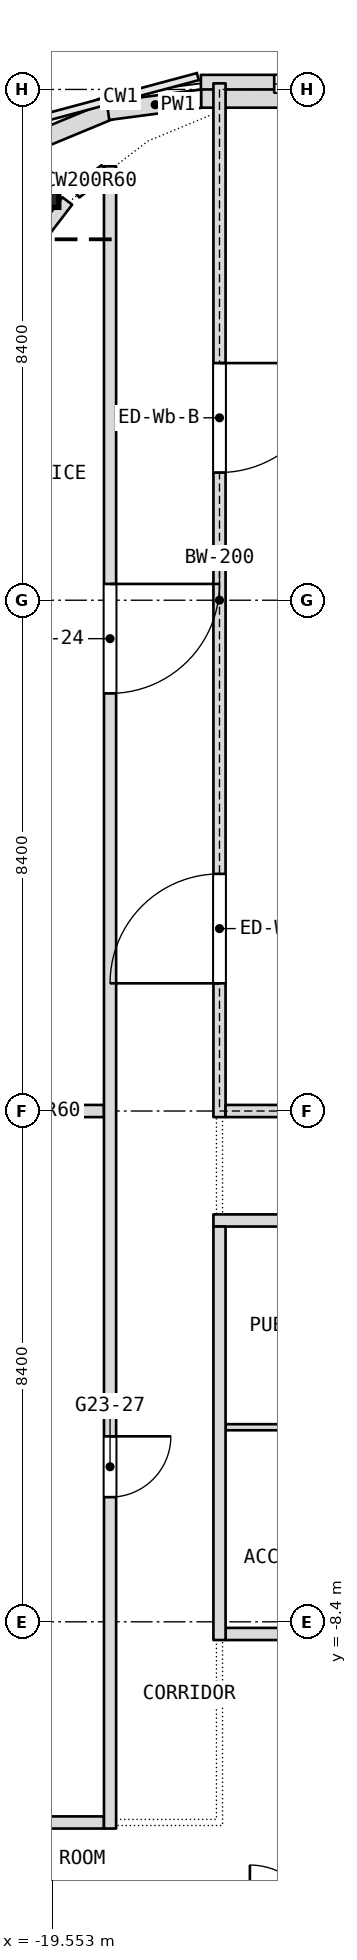
"""IFC4 building model, lengths in metres.
Left out: names, types, materials, properties, quantities, classifications, styles, units other than length and angle.
Written with IfcOpenShell. Run it as: python <this file> out.ifc"""

import sys

from ifc_helpers import new_model, si_unit, direction, frame, frame_2d, origin, origin_2d, place, context, subcontext, project, spatial, rectangle, i_section, extrude, element, fill, save


model = new_model("IFC4")
c1 = context("Model", 3, precision=1e-05, world=origin(), true_north=direction((0.0, 1.0)))
c2 = subcontext(c1, "Body", "Model", "MODEL_VIEW")
j1 = project(units=[si_unit("LENGTHUNIT", "METRE"), si_unit("PLANEANGLEUNIT", "RADIAN")], contexts=[c1])
p1 = place(None, origin())
s1 = spatial("IfcSite", under=j1, at=p1, CompositionType="ELEMENT")
p2 = place(p1, origin())
s2 = spatial("IfcBuilding", under=s1, at=p2, CompositionType="ELEMENT")
p3 = place(p2, frame((0.0, 0.0, 277.7)))
s3 = spatial("IfcBuildingStorey", under=s2, at=p3, CompositionType="ELEMENT", Elevation=277.7)
p4 = place(p3, frame((-19.596, 15.123, -0.26), z_axis=(0.0, 0.0, 1.0), x_axis=(1.0, 0.0, 0.0)))
e1 = element("IfcColumn", 1, at=p4, inside=s3, PredefinedType="COLUMN", context=c2, shape_type="SweptSolid", body=[
    extrude(i_section(OverallWidth=0.306, OverallDepth=0.524, WebThickness=0.024, FlangeThickness=0.04, FilletRadius=0.027, at=origin_2d()), origin(), (0.0, 0.0, 1.0), 3.2),
])
p5 = place(p3, frame((-21.0, -11.7, 0.0), z_axis=(0.0, 0.0, 1.0), x_axis=(1.0, 0.0, 0.0)))
e2 = element("IfcWall", 2, at=p5, inside=s3, PredefinedType="PARTITIONING", context=c2, shape_type="SweptSolid", body=[
    extrude(rectangle(XDim=2.3, YDim=0.2, at=frame_2d((1.15, 0.0))), origin(), (0.0, 0.0, 1.0), 3.34),
])
p6 = place(p3, frame((-16.7, -8.6, 0.0), z_axis=(0.0, 0.0, 1.0), x_axis=(1.0, 0.0, 0.0)))
e3 = element("IfcWall", 3, at=p6, inside=s3, PredefinedType="PARTITIONING", context=c2, shape_type="SweptSolid", body=[
    extrude(rectangle(XDim=8.4, YDim=0.2, at=frame_2d((4.2, 0.0))), origin(), (0.0, 0.0, 1.0), 3.34),
])
p7 = place(p3, frame((-16.7, -5.2, 0.0), z_axis=(0.0, 0.0, 1.0), x_axis=(1.0, 0.0, 0.0)))
e4 = element("IfcWall", 4, at=p7, inside=s3, PredefinedType="PARTITIONING", context=c2, shape_type="SweptSolid", body=[
    extrude(rectangle(XDim=4.2, YDim=0.1, at=frame_2d((2.1, 0.0))), origin(), (0.0, 0.0, 1.0), 3.34),
])
p8 = place(p7, frame((1.55, 0.0, 0.0)))
e5 = element("IfcOpeningElement", 5, at=p8, cuts=e4, PredefinedType="OPENING", context=c2, shape_type="SweptSolid", body=[
    extrude(rectangle(XDim=0.9, YDim=2.1, at=frame_2d((0.45, 1.05))), frame((0.0, 0.05, 0.0), z_axis=(0.0, -1.0, 0.0), x_axis=(1.0, 0.0, 0.0)), (0.0, 0.0, 1.0), 0.1),
])
p9 = place(p3, frame((-16.9, -1.8, 0.0), z_axis=(0.0, 0.0, 1.0), x_axis=(1.0, 0.0, 0.0)))
e6 = element("IfcWall", 6, at=p9, inside=s3, PredefinedType="PARTITIONING", context=c2, shape_type="SweptSolid", body=[
    extrude(rectangle(XDim=33.8, YDim=0.2, at=frame_2d((16.9, 0.0))), origin(), (0.0, 0.0, 1.0), 3.34),
])
p10 = place(p9, frame((1.7, 0.0, 0.0)))
e7 = element("IfcOpeningElement", 7, at=p10, cuts=e6, PredefinedType="OPENING", context=c2, shape_type="SweptSolid", body=[
    extrude(rectangle(XDim=1.0, YDim=2.1, at=frame_2d((0.5, 1.05))), frame((0.0, 0.1, 0.0), z_axis=(0.0, -1.0, 0.0), x_axis=(1.0, 0.0, 0.0)), (0.0, 0.0, 1.0), 0.2),
])
p11 = place(p9, frame((5.9, 0.0, 0.0)))
e8 = element("IfcOpeningElement", 8, at=p11, cuts=e6, PredefinedType="OPENING", context=c2, shape_type="SweptSolid", body=[
    extrude(rectangle(XDim=1.0, YDim=2.1, at=frame_2d((0.5, 1.05))), frame((0.0, 0.1, 0.0), z_axis=(0.0, -1.0, 0.0), x_axis=(1.0, 0.0, 0.0)), (0.0, 0.0, 1.0), 0.2),
])
p12 = place(p9, frame((10.1, 0.0, 0.0)))
e9 = element("IfcOpeningElement", 9, at=p12, cuts=e6, PredefinedType="OPENING", context=c2, shape_type="SweptSolid", body=[
    extrude(rectangle(XDim=1.0, YDim=2.1, at=frame_2d((0.5, 1.05))), frame((0.0, 0.1, 0.0), z_axis=(0.0, -1.0, 0.0), x_axis=(1.0, 0.0, 0.0)), (0.0, 0.0, 1.0), 0.2),
])
p13 = place(p9, frame((16.0, 0.0, 0.0)))
e10 = element("IfcOpeningElement", 10, at=p13, cuts=e6, PredefinedType="OPENING", context=c2, shape_type="SweptSolid", body=[
    extrude(rectangle(XDim=1.8, YDim=2.1, at=frame_2d((0.9, 1.05))), frame((0.0, 0.1, 0.0), z_axis=(0.0, -1.0, 0.0), x_axis=(1.0, 0.0, 0.0)), (0.0, 0.0, 1.0), 0.2),
])
p14 = place(p9, frame((22.7, 0.0, 0.0)))
e11 = element("IfcOpeningElement", 11, at=p14, cuts=e6, PredefinedType="OPENING", context=c2, shape_type="SweptSolid", body=[
    extrude(rectangle(XDim=1.0, YDim=2.1, at=frame_2d((0.5, 1.05))), frame((0.0, 0.1, 0.0), z_axis=(0.0, -1.0, 0.0), x_axis=(1.0, 0.0, 0.0)), (0.0, 0.0, 1.0), 0.2),
])
p15 = place(p9, frame((26.9, 0.0, 0.0)))
e12 = element("IfcOpeningElement", 12, at=p15, cuts=e6, PredefinedType="OPENING", context=c2, shape_type="SweptSolid", body=[
    extrude(rectangle(XDim=1.0, YDim=2.1, at=frame_2d((0.5, 1.05))), frame((0.0, 0.1, 0.0), z_axis=(0.0, -1.0, 0.0), x_axis=(1.0, 0.0, 0.0)), (0.0, 0.0, 1.0), 0.2),
])
p16 = place(p9, frame((31.1, 0.0, 0.0)))
e13 = element("IfcOpeningElement", 13, at=p16, cuts=e6, PredefinedType="OPENING", context=c2, shape_type="SweptSolid", body=[
    extrude(rectangle(XDim=1.0, YDim=2.1, at=frame_2d((0.5, 1.05))), frame((0.0, 0.1, 0.0), z_axis=(0.0, -1.0, 0.0), x_axis=(1.0, 0.0, 0.0)), (0.0, 0.0, 1.0), 0.2),
])
p17 = place(p3, frame((-21.0, 0.0, 0.0), z_axis=(0.0, 0.0, 1.0), x_axis=(1.0, 0.0, 0.0)))
e14 = element("IfcWall", 14, at=p17, inside=s3, PredefinedType="PARTITIONING", context=c2, shape_type="SweptSolid", body=[
    extrude(rectangle(XDim=2.3, YDim=0.2, at=frame_2d((1.15, 0.0))), origin(), (0.0, 0.0, 1.0), 2.94),
])
p18 = place(p3, frame((-16.8, -8.7, 0.0), z_axis=(0.0, 0.0, 1.0), x_axis=(0.0, 1.0, 0.0)))
e15 = element("IfcWall", 15, at=p18, inside=s3, PredefinedType="PARTITIONING", context=c2, shape_type="SweptSolid", body=[
    extrude(rectangle(XDim=6.8, YDim=0.2, at=frame_2d((3.4, 0.0))), origin(), (0.0, 0.0, 1.0), 3.34),
])
p19 = place(p3, frame((-18.6, -11.8, 0.0), z_axis=(0.0, 0.0, 1.0), x_axis=(0.0, 1.0, 0.0)))
e16 = element("IfcWall", 16, at=p19, inside=s3, PredefinedType="PARTITIONING", context=c2, shape_type="SweptSolid", body=[
    extrude(rectangle(XDim=27.336, YDim=0.2, at=frame_2d((13.668, 0.0))), origin(), (0.0, 0.0, 1.0), 3.34),
])
p20 = place(p19, frame((18.668, 0.0, 0.0)))
e17 = element("IfcOpeningElement", 17, at=p20, cuts=e16, PredefinedType="OPENING", context=c2, shape_type="SweptSolid", body=[
    extrude(rectangle(XDim=1.8, YDim=2.1, at=frame_2d((0.9, 1.05))), frame((0.0, 0.1, 0.0), z_axis=(0.0, -1.0, 0.0), x_axis=(1.0, 0.0, 0.0)), (0.0, 0.0, 1.0), 0.2),
])
p21 = place(p19, frame((5.45, 0.0, 0.0)))
e18 = element("IfcOpeningElement", 18, at=p21, cuts=e16, PredefinedType="OPENING", context=c2, shape_type="SweptSolid", body=[
    extrude(rectangle(XDim=1.0, YDim=2.1, at=frame_2d((0.5, 1.05))), frame((0.0, 0.1, 0.0), z_axis=(0.0, -1.0, 0.0), x_axis=(1.0, 0.0, 0.0)), (0.0, 0.0, 1.0), 0.2),
])
p22 = place(p3, frame((-19.166, 15.103, 0.0), z_axis=(0.0, 0.0, 1.0), x_axis=(0.794663000987, 0.607050833837, 0.0)))
e19 = element("IfcWall", 19, at=p22, inside=s3, PredefinedType="PARTITIONING", context=c2, shape_type="SweptSolid", body=[
    extrude(rectangle(XDim=0.613, YDim=0.2, at=frame_2d((0.306, 0.0))), origin(), (0.0, 0.0, 1.0), 3.34),
])
p23 = place(p3, frame((-20.136, 13.877, 0.0), z_axis=(0.0, 0.0, 1.0), x_axis=(0.607522804237, 0.794302236137, 0.0)))
e20 = element("IfcWall", 20, at=p23, inside=s3, PredefinedType="PARTITIONING", context=c2, shape_type="SweptSolid", body=[
    extrude(rectangle(XDim=1.371, YDim=0.2, at=frame_2d((0.686, 0.0))), origin(), (0.0, 0.0, 1.0), 3.34),
])
p24 = place(p3, frame((-12.6, 16.89, 0.0), z_axis=(0.0, 0.0, 1.0), x_axis=(-1.0, 0.0, 0.0)))
e21 = element("IfcWall", 21, at=p24, inside=s3, PredefinedType="NOTDEFINED", context=c2, shape_type="SweptSolid", body=[
    extrude(rectangle(XDim=4.506, YDim=0.3, at=frame_2d((2.253, 0.0))), origin(), (0.0, 0.0, 1.0), 3.6),
])
p25 = place(p24, frame((0.9, 0.0, 0.9)))
e22 = element("IfcOpeningElement", 22, at=p25, cuts=e21, PredefinedType="OPENING", context=c2, shape_type="SweptSolid", body=[
    extrude(rectangle(XDim=2.4, YDim=2.1, at=frame_2d((1.2, 1.05))), frame((0.0, 0.15, 0.0), z_axis=(0.0, -1.0, 0.0), x_axis=(1.0, 0.0, 0.0)), (0.0, 0.0, 1.0), 0.3),
])
p26 = place(p3, frame((-20.042, 15.858, 3.6), z_axis=(0.0, 0.0, 1.0), x_axis=(0.923881945474, 0.382677606907, 0.0)))
e23 = element("IfcWall", 23, at=p26, inside=s3, PredefinedType="PARAPET", context=c2, shape_type="SweptSolid", body=[
    extrude(rectangle(XDim=1.566, YDim=0.3, at=frame_2d((0.783, 0.0))), origin(), (0.0, 0.0, 1.0), 1.1),
])
p27 = place(p3, frame((-18.633, 16.447, 3.6), z_axis=(0.0, 0.0, 1.0), x_axis=(0.991453765022, 0.130458544462, 0.0)))
e24 = element("IfcWall", 24, at=p27, inside=s3, PredefinedType="PARAPET", context=c2, shape_type="SweptSolid", body=[
    extrude(rectangle(XDim=1.566, YDim=0.3, at=frame_2d((0.783, 0.0))), origin(), (0.0, 0.0, 1.0), 1.1),
])
p28 = place(p3, frame((-17.1, 16.65, 3.6), z_axis=(0.0, 0.0, 1.0), x_axis=(1.0, 0.0, 0.0)))
e25 = element("IfcWall", 25, at=p28, inside=s3, PredefinedType="PARAPET", context=c2, shape_type="SweptSolid", body=[
    extrude(rectangle(XDim=2.1, YDim=0.3, at=frame_2d((1.05, 0.0))), origin(), (0.0, 0.0, 1.0), 1.1),
])
p29 = place(p3, frame((-16.8, -0.1, 0.0), z_axis=(0.0, 0.0, 1.0), x_axis=(0.0, 1.0, 0.0)))
e26 = element("IfcWall", 26, at=p29, inside=s3, PredefinedType="PARTITIONING", context=c2, shape_type="SweptSolid", body=[
    extrude(rectangle(XDim=17.0, YDim=0.2, at=frame_2d((8.5, 0.0))), origin(), (0.0, 0.0, 1.0), 3.34),
])
p30 = place(p29, frame((2.2, 0.0, 0.0)))
e27 = element("IfcOpeningElement", 27, at=p30, cuts=e26, PredefinedType="OPENING", context=c2, shape_type="SweptSolid", body=[
    extrude(rectangle(XDim=1.8, YDim=2.1, at=frame_2d((0.9, 1.05))), frame((0.0, 0.1, 0.0), z_axis=(0.0, -1.0, 0.0), x_axis=(1.0, 0.0, 0.0)), (0.0, 0.0, 1.0), 0.2),
])
p31 = place(p29, frame((10.6, 0.0, 0.0)))
e28 = element("IfcOpeningElement", 28, at=p31, cuts=e26, PredefinedType="OPENING", context=c2, shape_type="SweptSolid", body=[
    extrude(rectangle(XDim=1.8, YDim=2.1, at=frame_2d((0.9, 1.05))), frame((0.0, 0.1, 0.0), z_axis=(0.0, -1.0, 0.0), x_axis=(1.0, 0.0, 0.0)), (0.0, 0.0, 1.0), 0.2),
])
p32 = place(p3, frame((-16.7, 0.0, 0.0), z_axis=(0.0, 0.0, 1.0), x_axis=(1.0, 0.0, 0.0)))
e29 = element("IfcWall", 29, at=p32, inside=s3, PredefinedType="PARTITIONING", context=c2, shape_type="SweptSolid", body=[
    extrude(rectangle(XDim=5.0, YDim=0.2, at=frame_2d((2.5, 0.0))), origin(), (0.0, 0.0, 1.0), 3.0),
])
p33 = place(p20, origin())
e30 = element("IfcDoor", 30, at=p33, inside=s3, OperationType="DOUBLE_DOOR_SINGLE_SWING", PredefinedType="DOOR", context=c2, shape_type="SweptSolid", body=[
    extrude(rectangle(XDim=1.8, YDim=2.1, at=frame_2d((0.9, 1.05))), frame((0.0, 0.025, 0.0), z_axis=(0.0, -1.0, 0.0), x_axis=(1.0, 0.0, 0.0)), (0.0, 0.0, 1.0), 0.05),
])
fill(e17, e30)
p34 = place(p21, origin())
e31 = element("IfcDoor", 31, at=p34, inside=s3, OperationType="SINGLE_SWING_LEFT", PredefinedType="DOOR", context=c2, shape_type="SweptSolid", body=[
    extrude(rectangle(XDim=1.0, YDim=2.1, at=frame_2d((0.5, 1.05))), frame((0.0, 0.025, 0.0), z_axis=(0.0, -1.0, 0.0), x_axis=(1.0, 0.0, 0.0)), (0.0, 0.0, 1.0), 0.05),
])
fill(e18, e31)
p35 = place(p25, origin())
e32 = element("IfcWindow", 32, at=p35, inside=s3, PartitioningType="SINGLE_PANEL", PredefinedType="WINDOW", context=c2, shape_type="SweptSolid", body=[
    extrude(rectangle(XDim=2.4, YDim=2.1, at=frame_2d((1.2, 1.05))), frame((0.0, 0.03, 0.0), z_axis=(0.0, -1.0, 0.0), x_axis=(1.0, 0.0, 0.0)), (0.0, 0.0, 1.0), 0.06),
])
fill(e22, e32)
p36 = place(p30, origin())
e33 = element("IfcDoor", 33, at=p36, inside=s3, OperationType="DOUBLE_DOOR_SINGLE_SWING", PredefinedType="DOOR", context=c2, shape_type="SweptSolid", body=[
    extrude(rectangle(XDim=1.8, YDim=2.1, at=frame_2d((0.9, 1.05))), frame((0.0, 0.025, 0.0), z_axis=(0.0, -1.0, 0.0), x_axis=(1.0, 0.0, 0.0)), (0.0, 0.0, 1.0), 0.05),
])
fill(e27, e33)
p37 = place(p31, origin())
e34 = element("IfcDoor", 34, at=p37, inside=s3, OperationType="DOUBLE_DOOR_SINGLE_SWING", PredefinedType="DOOR", context=c2, shape_type="SweptSolid", body=[
    extrude(rectangle(XDim=1.8, YDim=2.1, at=frame_2d((0.9, 1.05))), frame((0.0, 0.025, 0.0), z_axis=(0.0, -1.0, 0.0), x_axis=(1.0, 0.0, 0.0)), (0.0, 0.0, 1.0), 0.05),
])
fill(e28, e34)
save(model, sys.argv[1])
